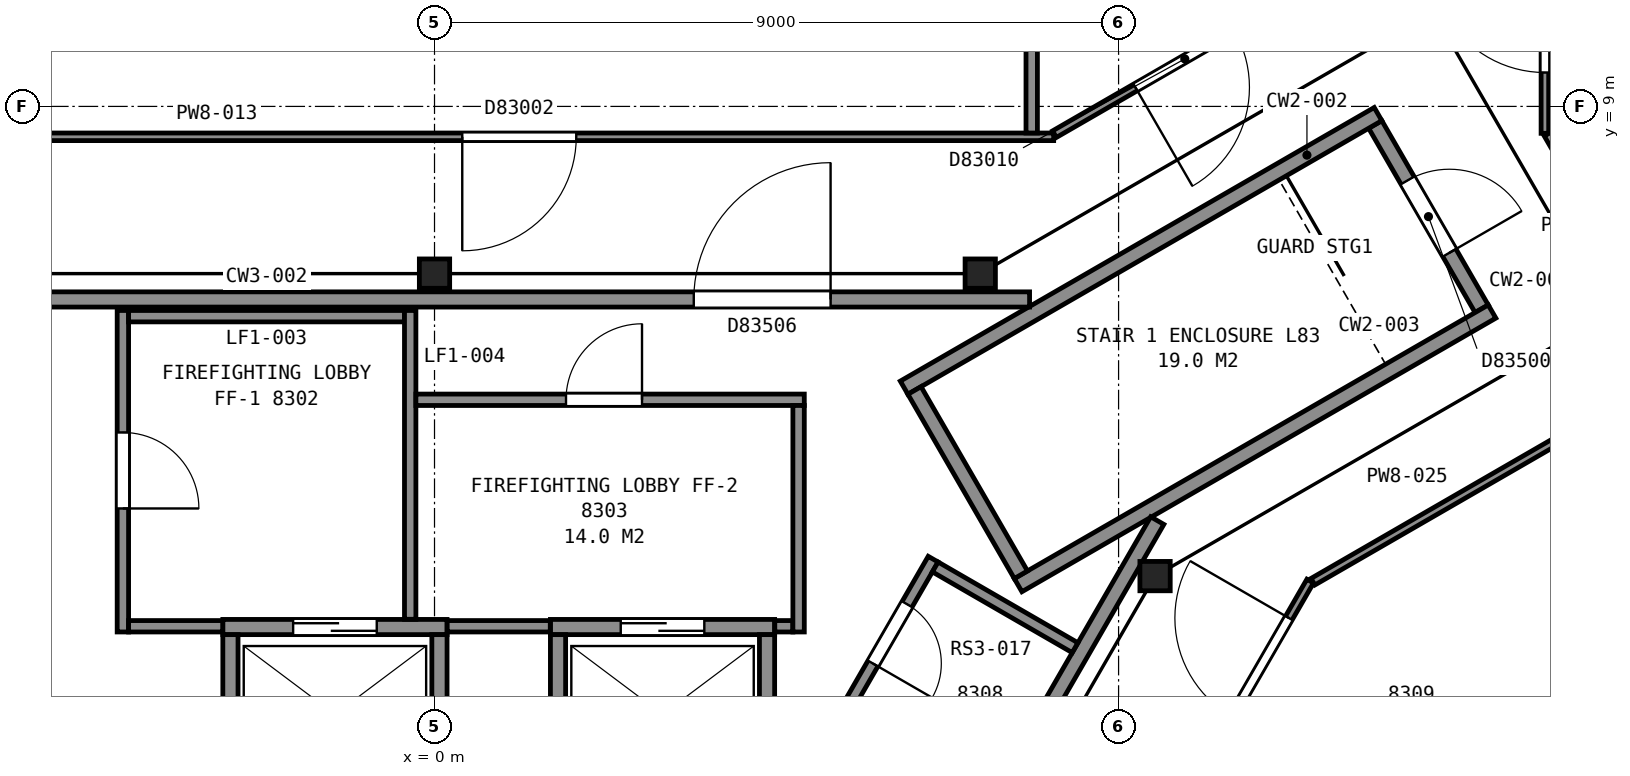
"""IFC4 building model, lengths in metres.
Left out: names, types, materials, properties, quantities, classifications, styles, units other than length and angle.
Written with IfcOpenShell. Run it as: python <this file> out.ifc"""

import sys

from ifc_helpers import new_model, si_unit, direction, frame, frame_2d, origin, origin_2d, place, context, subcontext, project, spatial, rectangle, i_section, extrude, element, fill, save


model = new_model("IFC4")
c1 = context("Model", 3, precision=1e-05, world=origin(), true_north=direction((0.0, 1.0)))
c2 = subcontext(c1, "Body", "Model", "MODEL_VIEW")
j1 = project(units=[si_unit("LENGTHUNIT", "METRE"), si_unit("PLANEANGLEUNIT", "RADIAN")], contexts=[c1])
p1 = place(None, origin())
s1 = spatial("IfcSite", under=j1, at=p1, CompositionType="ELEMENT")
p2 = place(p1, origin())
s2 = spatial("IfcBuilding", under=s1, at=p2, CompositionType="ELEMENT")
p3 = place(p2, frame((0.0, 0.0, 329.4)))
s3 = spatial("IfcBuildingStorey", under=s2, at=p3, CompositionType="ELEMENT", Elevation=329.4)
for number, where, z_axis, x_axis in (
    (1, (9.48, 2.82, 0.0), (0.0, 0.0, 1.0), (1.0, 0.0, 0.0)),
    (2, (7.18, 6.8, 0.0), (0.0, 0.0, 1.0), (1.0, 0.0, 0.0)),
    (3, (0.0, 6.8, 0.0), (0.0, 0.0, 1.0), (1.0, 0.0, 0.0)),
):
    element("IfcColumn", number, at=place(p3, frame(where, z_axis=z_axis, x_axis=x_axis)), inside=s3, PredefinedType="COLUMN", context=c2, shape_type="SweptSolid", body=[
        extrude(i_section(OverallWidth=0.399, OverallDepth=0.386, WebThickness=0.021, FlangeThickness=0.033, FilletRadius=0.015, at=origin_2d()), origin(), (0.0, 0.0, 1.0), 4.2),
    ])
p4 = place(p3, frame((13.777, 6.338, 0.0), z_axis=(0.0, 0.0, 1.0), x_axis=(-0.500049511043, 0.865996816683, 0.0)))
e4 = element("IfcWall", 4, at=p4, inside=s3, PredefinedType="PARTITIONING", context=c2, shape_type="SweptSolid", body=[
    extrude(rectangle(XDim=2.8, YDim=0.2, at=frame_2d((1.4, 0.0))), origin(), (0.0, 0.0, 1.0), 4.2),
])
p5 = place(p4, frame((0.85, 0.0, 0.0)))
e5 = element("IfcOpeningElement", 5, at=p5, cuts=e4, PredefinedType="OPENING", context=c2, shape_type="SweptSolid", body=[
    extrude(rectangle(XDim=1.1, YDim=2.1, at=frame_2d((0.55, 1.05))), frame((0.0, 0.11, 0.0), z_axis=(0.0, -1.0, 0.0), x_axis=(1.0, 0.0, 0.0)), (0.0, 0.0, 1.0), 0.22),
])
for number, where, z_axis, x_axis in (
    (6, (6.178, 5.299, 0.0), (0.0, 0.0, 1.0), (0.866, 0.5, 0.0)),
    (7, (7.678, 2.701, 0.0), (0.0, 0.0, 1.0), (0.866, 0.5, 0.0)),
):
    element("IfcWall", number, at=place(p3, frame(where, z_axis=z_axis, x_axis=x_axis)), inside=s3, PredefinedType="PARTITIONING", context=c2, shape_type="SweptSolid", body=[
        extrude(rectangle(XDim=7.2, YDim=0.2, at=frame_2d((3.6, 0.0))), origin(), (0.0, 0.0, 1.0), 4.2),
    ])
p6 = place(p3, frame((7.715, 2.838, 0.0), z_axis=(0.0, 0.0, 1.0), x_axis=(-0.500049511043, 0.865996816683, 0.0)))
e8 = element("IfcWall", 8, at=p6, inside=s3, PredefinedType="PARTITIONING", context=c2, shape_type="SweptSolid", body=[
    extrude(rectangle(XDim=2.8, YDim=0.2, at=frame_2d((1.4, 0.0))), origin(), (0.0, 0.0, 1.0), 4.2),
])
p7 = place(p3, frame((-2.785, 2.15, 0.0), z_axis=(0.0, 0.0, 1.0), x_axis=(1.0, 0.0, 0.0)))
e9 = element("IfcWall", 9, at=p7, inside=s3, PredefinedType="PARTITIONING", context=c2, shape_type="SweptSolid", body=[
    extrude(rectangle(XDim=2.95, YDim=0.2, at=frame_2d((1.475, 0.0))), origin(), (0.0, 0.0, 1.0), 4.2),
])
p8 = place(p7, frame((0.925, 0.0, 0.0)))
e10 = element("IfcOpeningElement", 10, at=p8, cuts=e9, PredefinedType="OPENING", context=c2, shape_type="SweptSolid", body=[
    extrude(rectangle(XDim=1.1, YDim=2.1, at=frame_2d((0.55, 1.05))), frame((0.0, 0.11, 0.0), z_axis=(0.0, -1.0, 0.0), x_axis=(1.0, 0.0, 0.0)), (0.0, 0.0, 1.0), 0.22),
])
p9 = place(p3, frame((1.525, 2.15, 0.0), z_axis=(0.0, 0.0, 1.0), x_axis=(1.0, 0.0, 0.0)))
e11 = element("IfcWall", 11, at=p9, inside=s3, PredefinedType="PARTITIONING", context=c2, shape_type="SweptSolid", body=[
    extrude(rectangle(XDim=2.95, YDim=0.2, at=frame_2d((1.475, 0.0))), origin(), (0.0, 0.0, 1.0), 4.2),
])
p10 = place(p9, frame((0.925, 0.0, 0.0)))
e12 = element("IfcOpeningElement", 12, at=p10, cuts=e11, PredefinedType="OPENING", context=c2, shape_type="SweptSolid", body=[
    extrude(rectangle(XDim=1.1, YDim=2.1, at=frame_2d((0.55, 1.05))), frame((0.0, 0.11, 0.0), z_axis=(0.0, -1.0, 0.0), x_axis=(1.0, 0.0, 0.0)), (0.0, 0.0, 1.0), 0.22),
])
for number, where, z_axis, x_axis in (
    (13, (4.375, 0.1, 0.0), (0.0, 0.0, 1.0), (0.0, 1.0, 0.0)),
    (14, (1.625, 0.1, 0.0), (0.0, 0.0, 1.0), (0.0, 1.0, 0.0)),
    (15, (0.065, 0.1, 0.0), (0.0, 0.0, 1.0), (0.0, 1.0, 0.0)),
    (16, (-2.685, 0.1, 0.0), (0.0, 0.0, 1.0), (0.0, 1.0, 0.0)),
):
    element("IfcWall", number, at=place(p3, frame(where, z_axis=z_axis, x_axis=x_axis)), inside=s3, PredefinedType="PARTITIONING", context=c2, shape_type="SweptSolid", body=[
        extrude(rectangle(XDim=1.95, YDim=0.2, at=frame_2d((0.975, 0.0))), origin(), (0.0, 0.0, 1.0), 4.2),
    ])
p11 = place(p3, frame((7.829, 6.46, 0.0), z_axis=(0.0, 0.0, 1.0), x_axis=(-1.0, 0.0, 0.0)))
e17 = element("IfcWall", 17, at=p11, inside=s3, PredefinedType="PARTITIONING", context=c2, shape_type="SweptSolid", body=[
    extrude(rectangle(XDim=15.658, YDim=0.2, at=frame_2d((7.829, 0.0))), origin(), (0.0, 0.0, 1.0), 3.9),
])
p12 = place(p11, frame((2.618, 0.0, 0.0)))
e18 = element("IfcOpeningElement", 18, at=p12, cuts=e17, PredefinedType="OPENING", context=c2, shape_type="SweptSolid", body=[
    extrude(rectangle(XDim=1.8, YDim=2.1, at=frame_2d((0.9, 1.05))), frame((0.0, 0.11, 0.0), z_axis=(0.0, -1.0, 0.0), x_axis=(1.0, 0.0, 0.0)), (0.0, 0.0, 1.0), 0.22),
])
p13 = place(p3, frame((-4.1, 2.085, 0.0), z_axis=(0.0, 0.0, 1.0), x_axis=(0.0, 1.0, 0.0)))
e19 = element("IfcWall", 19, at=p13, inside=s3, PredefinedType="PARTITIONING", context=c2, shape_type="SweptSolid", body=[
    extrude(rectangle(XDim=4.23, YDim=0.15, at=frame_2d((2.115, 0.0))), origin(), (0.0, 0.0, 1.0), 3.9),
])
p14 = place(p13, frame((1.625, 0.0, 0.0)))
e20 = element("IfcOpeningElement", 20, at=p14, cuts=e19, PredefinedType="OPENING", context=c2, shape_type="SweptSolid", body=[
    extrude(rectangle(XDim=1.0, YDim=2.1, at=frame_2d((0.5, 1.05))), frame((0.0, 0.085, 0.0), z_axis=(0.0, -1.0, 0.0), x_axis=(1.0, 0.0, 0.0)), (0.0, 0.0, 1.0), 0.17),
])
p15 = place(p3, frame((-4.025, 2.16, 0.0), z_axis=(0.0, 0.0, 1.0), x_axis=(1.0, 0.0, 0.0)))
e21 = element("IfcWall", 21, at=p15, inside=s3, PredefinedType="PARTITIONING", context=c2, shape_type="SweptSolid", body=[
    extrude(rectangle(XDim=1.238, YDim=0.15, at=frame_2d((0.619, 0.0))), origin(), (0.0, 0.0, 1.0), 3.9),
])
p16 = place(p3, frame((-4.025, 6.24, 0.0), z_axis=(0.0, 0.0, 1.0), x_axis=(1.0, 0.0, 0.0)))
e22 = element("IfcWall", 22, at=p16, inside=s3, PredefinedType="PARTITIONING", context=c2, shape_type="SweptSolid", body=[
    extrude(rectangle(XDim=3.63, YDim=0.15, at=frame_2d((1.815, 0.0))), origin(), (0.0, 0.0, 1.0), 3.9),
])
p17 = place(p3, frame((-0.32, 2.252, 0.0), z_axis=(0.0, 0.0, 1.0), x_axis=(0.0, 1.0, 0.0)))
e23 = element("IfcWall", 23, at=p17, inside=s3, PredefinedType="PARTITIONING", context=c2, shape_type="SweptSolid", body=[
    extrude(rectangle(XDim=4.063, YDim=0.15, at=frame_2d((2.031, 0.0))), origin(), (0.0, 0.0, 1.0), 3.9),
])
p18 = place(p3, frame((-0.245, 5.14, 0.0), z_axis=(0.0, 0.0, 1.0), x_axis=(1.0, 0.0, 0.0)))
e24 = element("IfcWall", 24, at=p18, inside=s3, PredefinedType="PARTITIONING", context=c2, shape_type="SweptSolid", body=[
    extrude(rectangle(XDim=5.11, YDim=0.15, at=frame_2d((2.555, 0.0))), origin(), (0.0, 0.0, 1.0), 3.9),
])
p19 = place(p18, frame((1.975, 0.0, 0.0)))
e25 = element("IfcOpeningElement", 25, at=p19, cuts=e24, PredefinedType="OPENING", context=c2, shape_type="SweptSolid", body=[
    extrude(rectangle(XDim=1.0, YDim=2.1, at=frame_2d((0.5, 1.05))), frame((0.0, 0.085, 0.0), z_axis=(0.0, -1.0, 0.0), x_axis=(1.0, 0.0, 0.0)), (0.0, 0.0, 1.0), 0.17),
])
p20 = place(p3, frame((0.167, 2.16, 0.0), z_axis=(0.0, 0.0, 1.0), x_axis=(1.0, 0.0, 0.0)))
e26 = element("IfcWall", 26, at=p20, inside=s3, PredefinedType="PARTITIONING", context=c2, shape_type="SweptSolid", body=[
    extrude(rectangle(XDim=1.356, YDim=0.15, at=frame_2d((0.678, 0.0))), origin(), (0.0, 0.0, 1.0), 3.9),
])
p21 = place(p3, frame((2.552, -8.5, 0.0), z_axis=(0.0, 0.0, 1.0), x_axis=(0.499981156672, 0.866036282712, 0.0)))
e27 = element("IfcWall", 27, at=p21, inside=s3, PredefinedType="PARTITIONING", context=c2, shape_type="SweptSolid", body=[
    extrude(rectangle(XDim=13.915, YDim=0.2, at=frame_2d((6.957, 0.0))), origin(), (0.0, 0.0, 1.0), 3.9),
])
p22 = place(p3, frame((6.561, 3.043, 0.0), z_axis=(0.0, 0.0, 1.0), x_axis=(-0.500011342071, -0.866018855338, 0.0)))
e28 = element("IfcWall", 28, at=p22, inside=s3, PredefinedType="PARTITIONING", context=c2, shape_type="SweptSolid", body=[
    extrude(rectangle(XDim=4.95, YDim=0.15, at=frame_2d((2.475, 0.0))), origin(), (0.0, 0.0, 1.0), 3.9),
])
p23 = place(p22, frame((0.685, 0.0, 0.0)))
e29 = element("IfcOpeningElement", 29, at=p23, cuts=e28, PredefinedType="OPENING", context=c2, shape_type="SweptSolid", body=[
    extrude(rectangle(XDim=0.9, YDim=2.1, at=frame_2d((0.45, 1.05))), frame((0.0, 0.085, 0.0), z_axis=(0.0, -1.0, 0.0), x_axis=(1.0, 0.0, 0.0)), (0.0, 0.0, 1.0), 0.17),
])
p24 = place(p3, frame((4.477, 2.16, 0.0), z_axis=(0.0, 0.0, 1.0), x_axis=(1.0, 0.0, 0.0)))
e30 = element("IfcWall", 30, at=p24, inside=s3, PredefinedType="PARTITIONING", context=c2, shape_type="SweptSolid", body=[
    extrude(rectangle(XDim=0.238, YDim=0.15, at=frame_2d((0.119, 0.0))), origin(), (0.0, 0.0, 1.0), 3.9),
])
p25 = place(p3, frame((4.79, 2.085, 0.0), z_axis=(0.0, 0.0, 1.0), x_axis=(0.0, 1.0, 0.0)))
e31 = element("IfcWall", 31, at=p25, inside=s3, PredefinedType="PARTITIONING", context=c2, shape_type="SweptSolid", body=[
    extrude(rectangle(XDim=2.98, YDim=0.15, at=frame_2d((1.49, 0.0))), origin(), (0.0, 0.0, 1.0), 3.9),
])
p26 = place(p3, frame((6.588, 2.94, 0.0), z_axis=(0.0, 0.0, 1.0), x_axis=(0.8659425006, -0.500143565044, 0.0)))
e32 = element("IfcWall", 32, at=p26, inside=s3, PredefinedType="PARTITIONING", context=c2, shape_type="SweptSolid", body=[
    extrude(rectangle(XDim=2.125, YDim=0.15, at=frame_2d((1.062, 0.0))), origin(), (0.0, 0.0, 1.0), 3.9),
])
p27 = place(p3, frame((-3.744, -10.714, 0.0), z_axis=(0.0, 0.0, 1.0), x_axis=(-0.500044034969, 0.86599997869, 0.0)))
e33 = element("IfcWall", 33, at=p27, inside=s3, PredefinedType="PARTITIONING", context=c2, shape_type="SweptSolid", body=[
    extrude(rectangle(XDim=15.553, YDim=0.1, at=frame_2d((7.776, 0.0))), origin(), (0.0, 0.0, 1.0), 3.297),
])
p28 = place(p27, frame((7.814, 0.0, 0.0)))
e34 = element("IfcOpeningElement", 34, at=p28, cuts=e33, PredefinedType="OPENING", context=c2, shape_type="SweptSolid", body=[
    extrude(rectangle(XDim=1.5, YDim=2.1, at=frame_2d((0.75, 1.05))), frame((0.0, 0.06, 0.0), z_axis=(0.0, -1.0, 0.0), x_axis=(1.0, 0.0, 0.0)), (0.0, 0.0, 1.0), 0.12),
])
p29 = place(p3, frame((-8.146, 8.6, 0.0), z_axis=(0.0, 0.0, 1.0), x_axis=(1.0, 0.0, 0.0)))
e35 = element("IfcWall", 35, at=p29, inside=s3, PredefinedType="PARTITIONING", context=c2, shape_type="SweptSolid", body=[
    extrude(rectangle(XDim=16.292, YDim=0.1, at=frame_2d((8.146, 0.0))), origin(), (0.0, 0.0, 1.0), 3.297),
])
p30 = place(p29, frame((8.511, 0.0, 0.0)))
e36 = element("IfcOpeningElement", 36, at=p30, cuts=e35, PredefinedType="OPENING", context=c2, shape_type="SweptSolid", body=[
    extrude(rectangle(XDim=1.5, YDim=2.1, at=frame_2d((0.75, 1.05))), frame((0.0, 0.06, 0.0), z_axis=(0.0, -1.0, 0.0), x_axis=(1.0, 0.0, 0.0)), (0.0, 0.0, 1.0), 0.12),
])
p31 = place(p29, frame((0.55, 0.0, 0.0)))
e37 = element("IfcOpeningElement", 37, at=p31, cuts=e35, PredefinedType="OPENING", context=c2, shape_type="SweptSolid", body=[
    extrude(rectangle(XDim=1.5, YDim=2.1, at=frame_2d((0.75, 1.05))), frame((0.0, 0.06, 0.0), z_axis=(0.0, -1.0, 0.0), x_axis=(1.0, 0.0, 0.0)), (0.0, 0.0, 1.0), 0.12),
])
p32 = place(p3, frame((11.521, 2.754, 0.0), z_axis=(0.0, 0.0, 1.0), x_axis=(-0.500044034969, -0.86599997869, 0.0)))
e38 = element("IfcWall", 38, at=p32, inside=s3, PredefinedType="PARTITIONING", context=c2, shape_type="SweptSolid", body=[
    extrude(rectangle(XDim=15.553, YDim=0.1, at=frame_2d((7.776, 0.0))), origin(), (0.0, 0.0, 1.0), 3.297),
])
p33 = place(p32, frame((8.303, 0.0, 0.0)))
e39 = element("IfcOpeningElement", 39, at=p33, cuts=e38, PredefinedType="OPENING", context=c2, shape_type="SweptSolid", body=[
    extrude(rectangle(XDim=1.5, YDim=2.1, at=frame_2d((0.75, 1.05))), frame((0.0, 0.06, 0.0), z_axis=(0.0, -1.0, 0.0), x_axis=(1.0, 0.0, 0.0)), (0.0, 0.0, 1.0), 0.12),
])
p34 = place(p32, frame((0.561, 0.0, 0.0)))
e40 = element("IfcOpeningElement", 40, at=p34, cuts=e38, PredefinedType="OPENING", context=c2, shape_type="SweptSolid", body=[
    extrude(rectangle(XDim=1.5, YDim=2.1, at=frame_2d((0.75, 1.05))), frame((0.0, 0.06, 0.0), z_axis=(0.0, -1.0, 0.0), x_axis=(1.0, 0.0, 0.0)), (0.0, 0.0, 1.0), 0.12),
])
p35 = place(p3, frame((7.857, 8.65, 0.0), z_axis=(0.0, 0.0, 1.0), x_axis=(0.0, 1.0, 0.0)))
e41 = element("IfcWall", 41, at=p35, inside=s3, PredefinedType="PARTITIONING", context=c2, shape_type="SweptSolid", body=[
    extrude(rectangle(XDim=3.783, YDim=0.15, at=frame_2d((1.892, 0.0))), origin(), (0.0, 0.0, 1.0), 3.297),
])
p36 = place(p3, frame((8.157, 8.635, 0.0), z_axis=(0.0, 0.0, 1.0), x_axis=(0.866029215606, 0.499993397673, 0.0)))
e42 = element("IfcWall", 42, at=p36, inside=s3, PredefinedType="PARTITIONING", context=c2, shape_type="SweptSolid", body=[
    extrude(rectangle(XDim=4.108, YDim=0.1, at=frame_2d((2.054, 0.0))), origin(), (0.0, 0.0, 1.0), 3.297),
])
p37 = place(p36, frame((1.23, 0.0, 0.0)))
e43 = element("IfcOpeningElement", 43, at=p37, cuts=e42, PredefinedType="OPENING", context=c2, shape_type="SweptSolid", body=[
    extrude(rectangle(XDim=1.5, YDim=2.1, at=frame_2d((0.75, 1.05))), frame((0.0, 0.06, 0.0), z_axis=(0.0, -1.0, 0.0), x_axis=(1.0, 0.0, 0.0)), (0.0, 0.0, 1.0), 0.12),
])
p38 = place(p3, frame((11.557, 2.746, 0.0), z_axis=(0.0, 0.0, 1.0), x_axis=(0.866005840187, 0.500033883614, 0.0)))
e44 = element("IfcWall", 44, at=p38, inside=s3, PredefinedType="PARTITIONING", context=c2, shape_type="SweptSolid", body=[
    extrude(rectangle(XDim=4.139, YDim=0.1, at=frame_2d((2.07, 0.0))), origin(), (0.0, 0.0, 1.0), 3.297),
])
p39 = place(p3, frame((14.609, 11.709, 0.0), z_axis=(0.0, 0.0, 1.0), x_axis=(0.0, -1.0, 0.0)))
e45 = element("IfcWall", 45, at=p39, inside=s3, PredefinedType="PARTITIONING", context=c2, shape_type="SweptSolid", body=[
    extrude(rectangle(XDim=3.063, YDim=0.1, at=frame_2d((1.531, 0.0))), origin(), (0.0, 0.0, 1.0), 3.297),
])
p40 = place(p39, frame((0.763, 0.0, 0.0)))
e46 = element("IfcOpeningElement", 46, at=p40, cuts=e45, PredefinedType="OPENING", context=c2, shape_type="SweptSolid", body=[
    extrude(rectangle(XDim=1.5, YDim=2.1, at=frame_2d((0.75, 1.05))), frame((0.0, 0.06, 0.0), z_axis=(0.0, -1.0, 0.0), x_axis=(1.0, 0.0, 0.0)), (0.0, 0.0, 1.0), 0.12),
])
p41 = place(p3, frame((14.644, 8.635, 0.0), z_axis=(0.0, 0.0, 1.0), x_axis=(0.499823463829, -0.866127303003, 0.0)))
e47 = element("IfcWall", 47, at=p41, inside=s3, PredefinedType="PARTITIONING", context=c2, shape_type="SweptSolid", body=[
    extrude(rectangle(XDim=0.976, YDim=0.1, at=frame_2d((0.488, 0.0))), origin(), (0.0, 0.0, 1.0), 3.297),
])
p42 = place(p5, origin())
e48 = element("IfcDoor", 48, at=p42, inside=s3, OperationType="SINGLE_SWING_LEFT", PredefinedType="DOOR", context=c2, shape_type="SweptSolid", body=[
    extrude(rectangle(XDim=1.1, YDim=2.1, at=frame_2d((0.55, 1.05))), frame((0.0, 0.025, 0.0), z_axis=(0.0, -1.0, 0.0), x_axis=(1.0, 0.0, 0.0)), (0.0, 0.0, 1.0), 0.05),
])
fill(e5, e48)
p43 = place(p8, origin())
e49 = element("IfcDoor", 49, at=p43, inside=s3, OperationType="SLIDING_TO_LEFT", PredefinedType="DOOR", context=c2, shape_type="SweptSolid", body=[
    extrude(rectangle(XDim=1.1, YDim=2.1, at=frame_2d((0.55, 1.05))), frame((0.0, 0.025, 0.0), z_axis=(0.0, -1.0, 0.0), x_axis=(1.0, 0.0, 0.0)), (0.0, 0.0, 1.0), 0.05),
])
fill(e10, e49)
p44 = place(p10, origin())
e50 = element("IfcDoor", 50, at=p44, inside=s3, OperationType="SLIDING_TO_RIGHT", PredefinedType="DOOR", context=c2, shape_type="SweptSolid", body=[
    extrude(rectangle(XDim=1.1, YDim=2.1, at=frame_2d((0.55, 1.05))), frame((0.0, 0.025, 0.0), z_axis=(0.0, -1.0, 0.0), x_axis=(1.0, 0.0, 0.0)), (0.0, 0.0, 1.0), 0.05),
])
fill(e12, e50)
p45 = place(p12, origin())
e51 = element("IfcDoor", 51, at=p45, inside=s3, OperationType="DOUBLE_DOOR_SINGLE_SWING", PredefinedType="DOOR", context=c2, shape_type="SweptSolid", body=[
    extrude(rectangle(XDim=1.8, YDim=2.1, at=frame_2d((0.9, 1.05))), frame((0.0, 0.025, 0.0), z_axis=(0.0, -1.0, 0.0), x_axis=(1.0, 0.0, 0.0)), (0.0, 0.0, 1.0), 0.05),
])
fill(e18, e51)
p46 = place(p14, origin())
e52 = element("IfcDoor", 52, at=p46, inside=s3, OperationType="SINGLE_SWING_LEFT", PredefinedType="DOOR", context=c2, shape_type="SweptSolid", body=[
    extrude(rectangle(XDim=1.0, YDim=2.1, at=frame_2d((0.5, 1.05))), frame((0.0, 0.025, 0.0), z_axis=(0.0, -1.0, 0.0), x_axis=(1.0, 0.0, 0.0)), (0.0, 0.0, 1.0), 0.05),
])
fill(e20, e52)
p47 = place(p19, origin())
e53 = element("IfcDoor", 53, at=p47, inside=s3, OperationType="SINGLE_SWING_RIGHT", PredefinedType="DOOR", context=c2, shape_type="SweptSolid", body=[
    extrude(rectangle(XDim=1.0, YDim=2.1, at=frame_2d((0.5, 1.05))), frame((0.0, 0.025, 0.0), z_axis=(0.0, -1.0, 0.0), x_axis=(1.0, 0.0, 0.0)), (0.0, 0.0, 1.0), 0.05),
])
fill(e25, e53)
p48 = place(p23, origin())
e54 = element("IfcDoor", 54, at=p48, inside=s3, OperationType="SINGLE_SWING_RIGHT", PredefinedType="DOOR", context=c2, shape_type="SweptSolid", body=[
    extrude(rectangle(XDim=0.9, YDim=2.1, at=frame_2d((0.45, 1.05))), frame((0.0, 0.025, 0.0), z_axis=(0.0, -1.0, 0.0), x_axis=(1.0, 0.0, 0.0)), (0.0, 0.0, 1.0), 0.05),
])
fill(e29, e54)
p49 = place(p30, origin())
e55 = element("IfcDoor", 55, at=p49, inside=s3, OperationType="DOUBLE_DOOR_SINGLE_SWING", PredefinedType="DOOR", context=c2, shape_type="SweptSolid", body=[
    extrude(rectangle(XDim=1.5, YDim=2.1, at=frame_2d((0.75, 1.05))), frame((0.0, 0.025, 0.0), z_axis=(0.0, -1.0, 0.0), x_axis=(1.0, 0.0, 0.0)), (0.0, 0.0, 1.0), 0.05),
])
fill(e36, e55)
p50 = place(p34, origin())
e56 = element("IfcDoor", 56, at=p50, inside=s3, OperationType="DOUBLE_DOOR_SINGLE_SWING", PredefinedType="DOOR", context=c2, shape_type="SweptSolid", body=[
    extrude(rectangle(XDim=1.5, YDim=2.1, at=frame_2d((0.75, 1.05))), frame((0.0, 0.025, 0.0), z_axis=(0.0, -1.0, 0.0), x_axis=(1.0, 0.0, 0.0)), (0.0, 0.0, 1.0), 0.05),
])
fill(e40, e56)
p51 = place(p37, origin())
e57 = element("IfcDoor", 57, at=p51, inside=s3, OperationType="DOUBLE_DOOR_SINGLE_SWING", PredefinedType="DOOR", context=c2, shape_type="SweptSolid", body=[
    extrude(rectangle(XDim=1.5, YDim=2.1, at=frame_2d((0.75, 1.05))), frame((0.0, 0.025, 0.0), z_axis=(0.0, -1.0, 0.0), x_axis=(1.0, 0.0, 0.0)), (0.0, 0.0, 1.0), 0.05),
])
fill(e43, e57)
p52 = place(p40, origin())
e58 = element("IfcDoor", 58, at=p52, inside=s3, OperationType="DOUBLE_DOOR_SINGLE_SWING", PredefinedType="DOOR", context=c2, shape_type="SweptSolid", body=[
    extrude(rectangle(XDim=1.5, YDim=2.1, at=frame_2d((0.75, 1.05))), frame((0.0, 0.025, 0.0), z_axis=(0.0, -1.0, 0.0), x_axis=(1.0, 0.0, 0.0)), (0.0, 0.0, 1.0), 0.05),
])
fill(e46, e58)
save(model, sys.argv[1])
